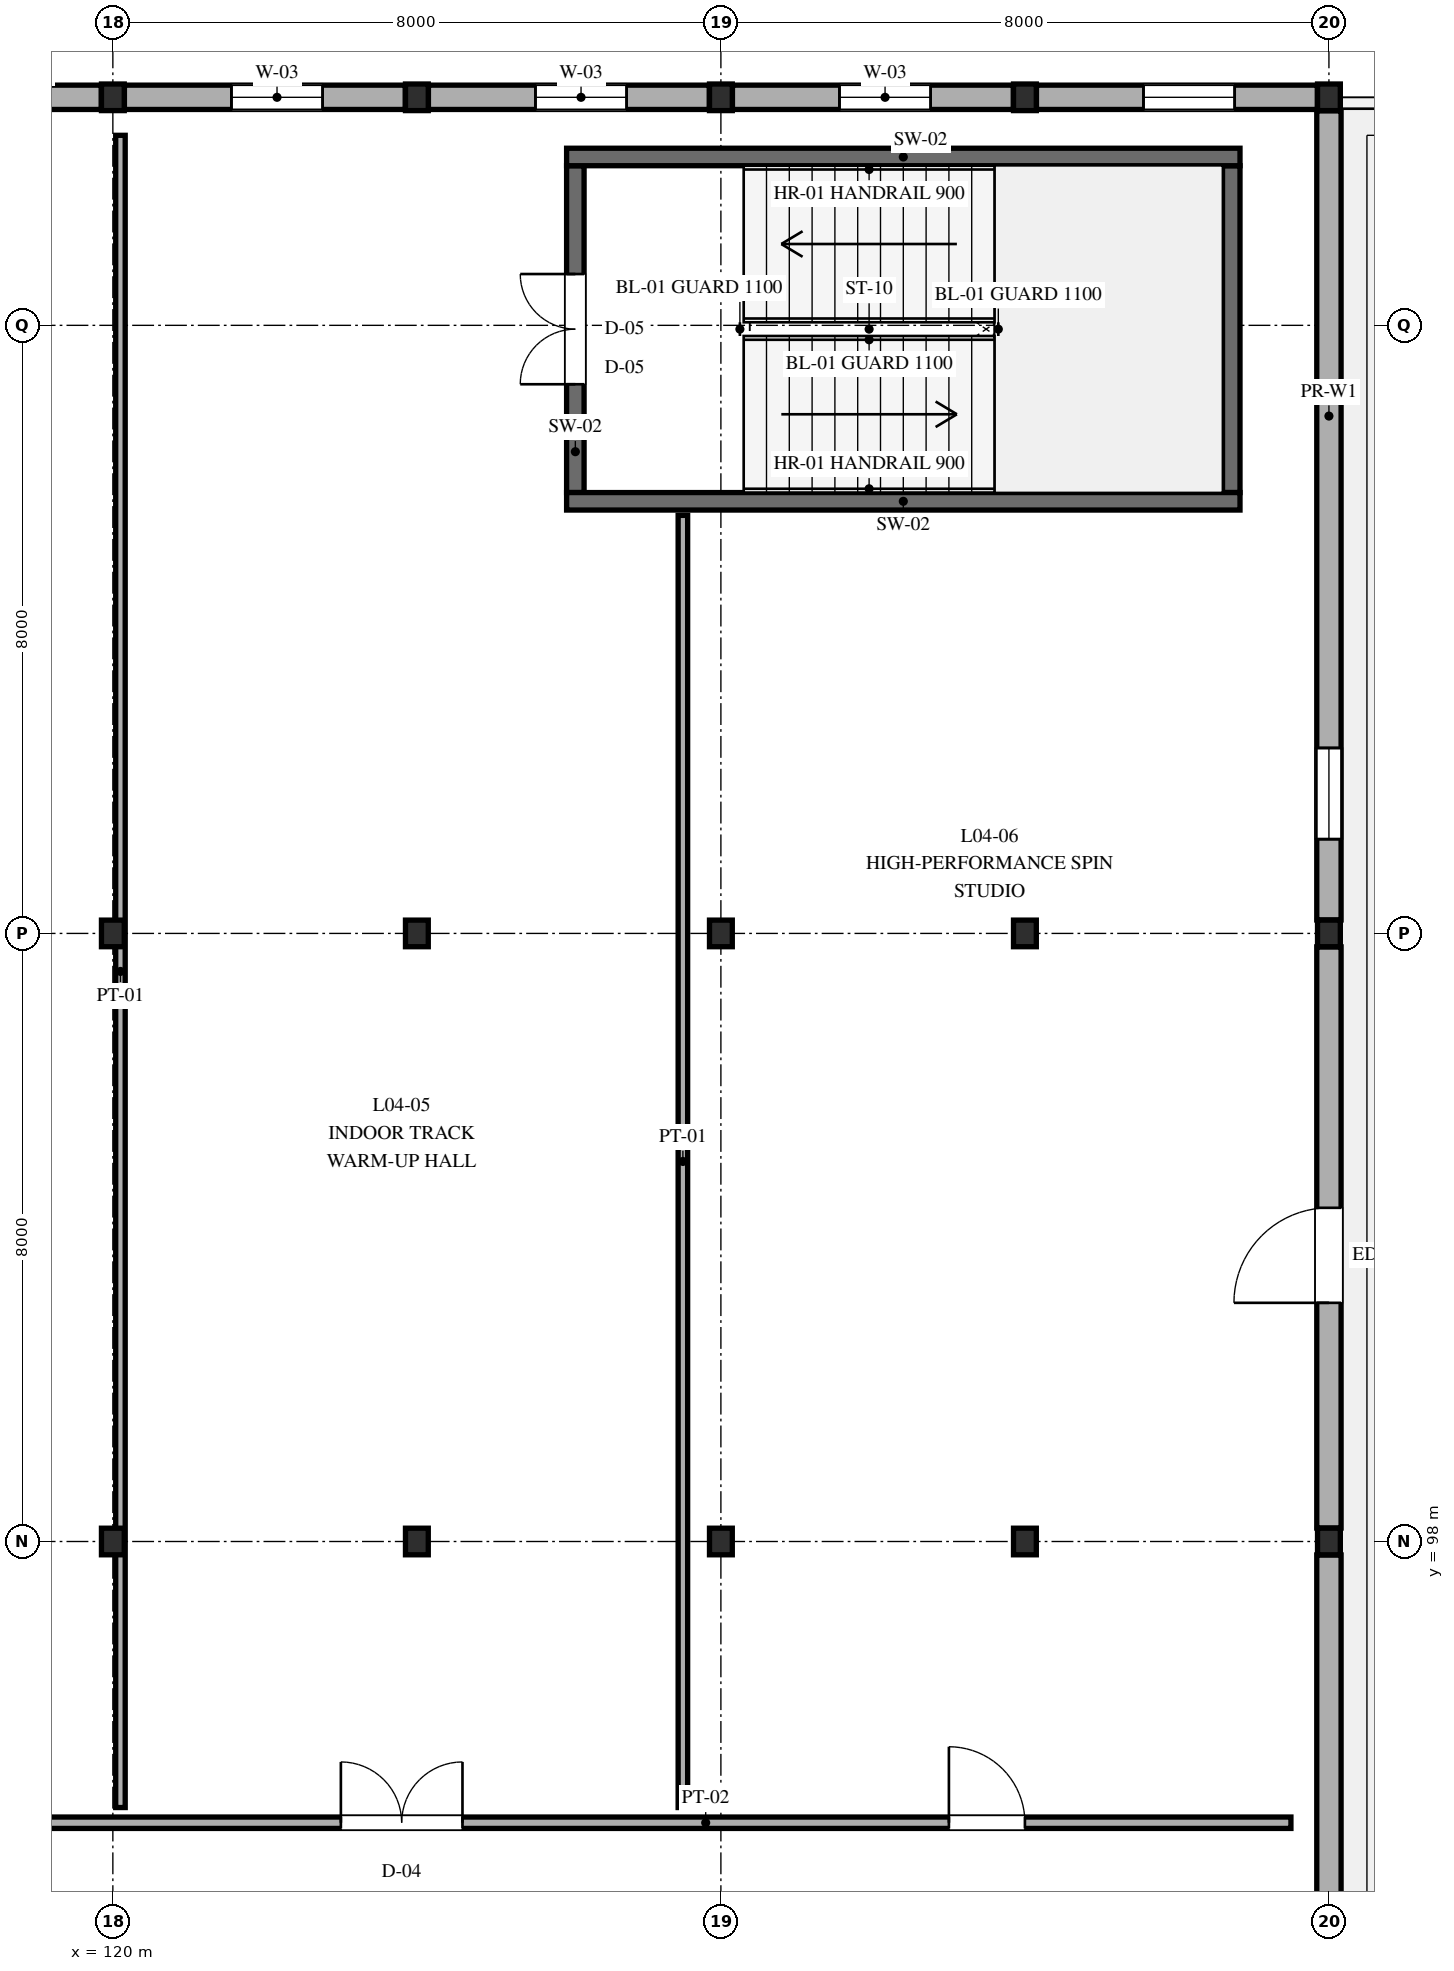
"""IFC4 building model, lengths in metres.
Left out: names, types, materials, properties, quantities, classifications, styles, units other than length and angle.
Written with IfcOpenShell. Run it as: python <this file> out.ifc"""

import sys

from ifc_helpers import new_model, si_unit, direction, frame, frame_2d, origin, origin_2d, place, context, subcontext, project, spatial, rectangle, i_section, extrude, element, fill, save


model = new_model("IFC4")
c1 = context("Model", 3, precision=1e-05, world=origin(), true_north=direction((0.0, 1.0)))
c2 = subcontext(c1, "Body", "Model", "MODEL_VIEW")
j1 = project(units=[si_unit("LENGTHUNIT", "METRE"), si_unit("PLANEANGLEUNIT", "RADIAN")], contexts=[c1])
p1 = place(None, origin())
s1 = spatial("IfcSite", under=j1, at=p1, CompositionType="ELEMENT")
p2 = place(p1, origin())
s2 = spatial("IfcBuilding", under=s1, at=p2, CompositionType="ELEMENT")
p3 = place(p2, frame((0.0, 0.0, 18.6)))
s3 = spatial("IfcBuildingStorey", under=s2, at=p3, CompositionType="ELEMENT", Elevation=18.6)
for number, where, z_axis, x_axis in (
    (1, (120.0, 98.0, 0.0), (0.0, 0.0, 1.0), (1.0, 0.0, 0.0)),
    (2, (120.0, 106.0, 0.0), (0.0, 0.0, 1.0), (1.0, 0.0, 0.0)),
    (3, (120.0, 117.0, 0.0), (0.0, 0.0, 1.0), (1.0, 0.0, 0.0)),
    (4, (124.0, 98.0, 0.0), (0.0, 0.0, 1.0), (1.0, 0.0, 0.0)),
    (5, (124.0, 106.0, 0.0), (0.0, 0.0, 1.0), (1.0, 0.0, 0.0)),
    (6, (124.0, 117.0, 0.0), (0.0, 0.0, 1.0), (1.0, 0.0, 0.0)),
    (7, (128.0, 98.0, 0.0), (0.0, 0.0, 1.0), (1.0, 0.0, 0.0)),
    (8, (128.0, 106.0, 0.0), (0.0, 0.0, 1.0), (1.0, 0.0, 0.0)),
    (9, (128.0, 117.0, 0.0), (0.0, 0.0, 1.0), (1.0, 0.0, 0.0)),
    (10, (132.0, 98.0, 0.0), (0.0, 0.0, 1.0), (1.0, 0.0, 0.0)),
    (11, (132.0, 106.0, 0.0), (0.0, 0.0, 1.0), (1.0, 0.0, 0.0)),
    (12, (132.0, 117.0, 0.0), (0.0, 0.0, 1.0), (1.0, 0.0, 0.0)),
    (13, (136.0, 98.0, 0.0), (0.0, 0.0, 1.0), (1.0, 0.0, 0.0)),
    (14, (136.0, 106.0, 0.0), (0.0, 0.0, 1.0), (1.0, 0.0, 0.0)),
    (15, (136.0, 117.0, 0.0), (0.0, 0.0, 1.0), (1.0, 0.0, 0.0)),
):
    element("IfcColumn", number, at=place(p3, frame(where, z_axis=z_axis, x_axis=x_axis)), inside=s3, PredefinedType="COLUMN", context=c2, shape_type="SweptSolid", body=[
        extrude(i_section(OverallWidth=0.3, OverallDepth=0.35, WebThickness=0.01, FlangeThickness=0.018, FilletRadius=0.027, at=origin_2d()), origin(), (0.0, 0.0, 1.0), 3.6),
    ])
p4 = place(p3, frame((119.848, 117.0, 0.0), z_axis=(0.0, 0.0, 1.0), x_axis=(-1.0, 0.0, 0.0)))
e16 = element("IfcWall", 16, at=p4, inside=s3, PredefinedType="STANDARD", context=c2, shape_type="SweptSolid", body=[
    extrude(rectangle(XDim=7.696, YDim=0.32, at=frame_2d((3.848, 0.0))), origin(), (0.0, 0.0, 1.0), 3.05),
])
p5 = place(p4, frame((2.388, 0.0, 0.95)))
e17 = element("IfcOpeningElement", 17, at=p5, cuts=e16, PredefinedType="OPENING", context=c2, shape_type="SweptSolid", body=[
    extrude(rectangle(XDim=2.1, YDim=1.5, at=frame_2d((1.05, 0.75))), frame((0.0, 0.17, 0.0), z_axis=(0.0, -1.0, 0.0), x_axis=(1.0, 0.0, 0.0)), (0.0, 0.0, 1.0), 0.34),
])
p6 = place(p3, frame((123.848, 117.0, 0.0), z_axis=(0.0, 0.0, 1.0), x_axis=(-1.0, 0.0, 0.0)))
e18 = element("IfcWall", 18, at=p6, inside=s3, PredefinedType="STANDARD", context=c2, shape_type="SweptSolid", body=[
    extrude(rectangle(XDim=3.696, YDim=0.32, at=frame_2d((1.848, 0.0))), origin(), (0.0, 0.0, 1.0), 3.05),
])
p7 = place(p6, frame((1.088, 0.0, 0.95)))
e19 = element("IfcOpeningElement", 19, at=p7, cuts=e18, PredefinedType="OPENING", context=c2, shape_type="SweptSolid", body=[
    extrude(rectangle(XDim=1.2, YDim=1.5, at=frame_2d((0.6, 0.75))), frame((0.0, 0.17, 0.0), z_axis=(0.0, -1.0, 0.0), x_axis=(1.0, 0.0, 0.0)), (0.0, 0.0, 1.0), 0.34),
])
p8 = place(p3, frame((127.848, 117.0, 0.0), z_axis=(0.0, 0.0, 1.0), x_axis=(-1.0, 0.0, 0.0)))
e20 = element("IfcWall", 20, at=p8, inside=s3, PredefinedType="STANDARD", context=c2, shape_type="SweptSolid", body=[
    extrude(rectangle(XDim=3.696, YDim=0.32, at=frame_2d((1.848, 0.0))), origin(), (0.0, 0.0, 1.0), 3.05),
])
p9 = place(p8, frame((1.088, 0.0, 0.95)))
e21 = element("IfcOpeningElement", 21, at=p9, cuts=e20, PredefinedType="OPENING", context=c2, shape_type="SweptSolid", body=[
    extrude(rectangle(XDim=1.2, YDim=1.5, at=frame_2d((0.6, 0.75))), frame((0.0, 0.17, 0.0), z_axis=(0.0, -1.0, 0.0), x_axis=(1.0, 0.0, 0.0)), (0.0, 0.0, 1.0), 0.34),
])
p10 = place(p3, frame((131.848, 117.0, 0.0), z_axis=(0.0, 0.0, 1.0), x_axis=(-1.0, 0.0, 0.0)))
e22 = element("IfcWall", 22, at=p10, inside=s3, PredefinedType="STANDARD", context=c2, shape_type="SweptSolid", body=[
    extrude(rectangle(XDim=3.696, YDim=0.32, at=frame_2d((1.848, 0.0))), origin(), (0.0, 0.0, 1.0), 3.05),
])
p11 = place(p10, frame((1.088, 0.0, 0.95)))
e23 = element("IfcOpeningElement", 23, at=p11, cuts=e22, PredefinedType="OPENING", context=c2, shape_type="SweptSolid", body=[
    extrude(rectangle(XDim=1.2, YDim=1.5, at=frame_2d((0.6, 0.75))), frame((0.0, 0.17, 0.0), z_axis=(0.0, -1.0, 0.0), x_axis=(1.0, 0.0, 0.0)), (0.0, 0.0, 1.0), 0.34),
])
p12 = place(p3, frame((135.848, 117.0, 0.0), z_axis=(0.0, 0.0, 1.0), x_axis=(-1.0, 0.0, 0.0)))
e24 = element("IfcWall", 24, at=p12, inside=s3, PredefinedType="STANDARD", context=c2, shape_type="SweptSolid", body=[
    extrude(rectangle(XDim=3.696, YDim=0.32, at=frame_2d((1.848, 0.0))), origin(), (0.0, 0.0, 1.0), 3.05),
])
p13 = place(p12, frame((1.088, 0.0, 0.95)))
e25 = element("IfcOpeningElement", 25, at=p13, cuts=e24, PredefinedType="OPENING", context=c2, shape_type="SweptSolid", body=[
    extrude(rectangle(XDim=1.2, YDim=1.5, at=frame_2d((0.6, 0.75))), frame((0.0, 0.17, 0.0), z_axis=(0.0, -1.0, 0.0), x_axis=(1.0, 0.0, 0.0)), (0.0, 0.0, 1.0), 0.34),
])
p14 = place(p3, frame((136.0, 90.177, 0.0), z_axis=(0.0, 0.0, 1.0), x_axis=(0.0, 1.0, 0.0)))
e26 = element("IfcWall", 26, at=p14, inside=s3, PredefinedType="STANDARD", context=c2, shape_type="SweptSolid", body=[
    extrude(rectangle(XDim=7.646, YDim=0.32, at=frame_2d((3.823, 0.0))), origin(), (0.0, 0.0, 1.0), 3.05),
])
p15 = place(p14, frame((1.063, 0.0, 0.95)))
e27 = element("IfcOpeningElement", 27, at=p15, cuts=e26, PredefinedType="OPENING", context=c2, shape_type="SweptSolid", body=[
    extrude(rectangle(XDim=1.2, YDim=1.5, at=frame_2d((0.6, 0.75))), frame((0.0, 0.17, 0.0), z_axis=(0.0, -1.0, 0.0), x_axis=(1.0, 0.0, 0.0)), (0.0, 0.0, 1.0), 0.34),
])
p16 = place(p3, frame((136.0, 98.177, 0.0), z_axis=(0.0, 0.0, 1.0), x_axis=(0.0, 1.0, 0.0)))
e28 = element("IfcWall", 28, at=p16, inside=s3, PredefinedType="STANDARD", context=c2, shape_type="SweptSolid", body=[
    extrude(rectangle(XDim=7.646, YDim=0.32, at=frame_2d((3.823, 0.0))), origin(), (0.0, 0.0, 1.0), 3.05),
])
p17 = place(p16, frame((2.963, 0.0, 0.0)))
e29 = element("IfcOpeningElement", 29, at=p17, cuts=e28, PredefinedType="OPENING", context=c2, shape_type="SweptSolid", body=[
    extrude(rectangle(XDim=1.25, YDim=2.2, at=frame_2d((0.625, 1.1))), frame((0.0, 0.17, 0.0), z_axis=(0.0, -1.0, 0.0), x_axis=(1.0, 0.0, 0.0)), (0.0, 0.0, 1.0), 0.34),
])
p18 = place(p3, frame((136.0, 106.177, 0.0), z_axis=(0.0, 0.0, 1.0), x_axis=(0.0, 1.0, 0.0)))
e30 = element("IfcWall", 30, at=p18, inside=s3, PredefinedType="STANDARD", context=c2, shape_type="SweptSolid", body=[
    extrude(rectangle(XDim=10.646, YDim=0.32, at=frame_2d((5.323, 0.0))), origin(), (0.0, 0.0, 1.0), 3.05),
])
p19 = place(p18, frame((1.063, 0.0, 0.95)))
e31 = element("IfcOpeningElement", 31, at=p19, cuts=e30, PredefinedType="OPENING", context=c2, shape_type="SweptSolid", body=[
    extrude(rectangle(XDim=1.2, YDim=1.5, at=frame_2d((0.6, 0.75))), frame((0.0, 0.17, 0.0), z_axis=(0.0, -1.0, 0.0), x_axis=(1.0, 0.0, 0.0)), (0.0, 0.0, 1.0), 0.34),
])
p20 = place(p3, frame((126.085, 111.8, 0.0), z_axis=(0.0, 0.0, 1.0), x_axis=(0.0, 1.0, 0.0)))
e32 = element("IfcWall", 32, at=p20, inside=s3, PredefinedType="SHEAR", context=c2, shape_type="SweptSolid", body=[
    extrude(rectangle(XDim=4.3, YDim=0.23, at=frame_2d((2.15, 0.0))), origin(), (0.0, 0.0, 1.0), 3.6),
])
p21 = place(p20, frame((1.425, 0.0, 0.0)))
e33 = element("IfcOpeningElement", 33, at=p21, cuts=e32, PredefinedType="OPENING", context=c2, shape_type="SweptSolid", body=[
    extrude(rectangle(XDim=1.45, YDim=2.2, at=frame_2d((0.725, 1.1))), frame((0.0, 0.125, 0.0), z_axis=(0.0, -1.0, 0.0), x_axis=(1.0, 0.0, 0.0)), (0.0, 0.0, 1.0), 0.25),
])
p22 = place(p3, frame((134.715, 116.1, 0.0), z_axis=(0.0, 0.0, 1.0), x_axis=(0.0, -1.0, 0.0)))
e34 = element("IfcWall", 34, at=p22, inside=s3, PredefinedType="SHEAR", context=c2, shape_type="SweptSolid", body=[
    extrude(rectangle(XDim=4.3, YDim=0.23, at=frame_2d((2.15, 0.0))), origin(), (0.0, 0.0, 1.0), 3.6),
])
for number, where, z_axis, x_axis in (
    (35, (125.97, 111.685, 0.0), (0.0, 0.0, 1.0), (1.0, 0.0, 0.0)),
    (36, (134.83, 116.215, 0.0), (0.0, 0.0, 1.0), (-1.0, 0.0, 0.0)),
):
    element("IfcWall", number, at=place(p3, frame(where, z_axis=z_axis, x_axis=x_axis)), inside=s3, PredefinedType="SHEAR", context=c2, shape_type="SweptSolid", body=[
        extrude(rectangle(XDim=8.86, YDim=0.23, at=frame_2d((4.43, 0.0))), origin(), (0.0, 0.0, 1.0), 3.6),
    ])
p23 = place(p3, frame((104.5, 94.3, 0.0), z_axis=(0.0, 0.0, 1.0), x_axis=(1.0, 0.0, 0.0)))
e37 = element("IfcWall", 37, at=p23, inside=s3, PredefinedType="PARTITIONING", context=c2, shape_type="SweptSolid", body=[
    extrude(rectangle(XDim=31.0, YDim=0.15, at=frame_2d((15.5, 0.0))), origin(), (0.0, 0.0, 1.0), 3.05),
])
p24 = place(p23, frame((3.2, 0.0, 0.0)))
e38 = element("IfcOpeningElement", 38, at=p24, cuts=e37, PredefinedType="OPENING", context=c2, shape_type="SweptSolid", body=[
    extrude(rectangle(XDim=1.05, YDim=2.15, at=frame_2d((0.525, 1.075))), frame((0.0, 0.085, 0.0), z_axis=(0.0, -1.0, 0.0), x_axis=(1.0, 0.0, 0.0)), (0.0, 0.0, 1.0), 0.17),
])
p25 = place(p23, frame((11.5, 0.0, 0.0)))
e39 = element("IfcOpeningElement", 39, at=p25, cuts=e37, PredefinedType="OPENING", context=c2, shape_type="SweptSolid", body=[
    extrude(rectangle(XDim=1.6, YDim=2.2, at=frame_2d((0.8, 1.1))), frame((0.0, 0.085, 0.0), z_axis=(0.0, -1.0, 0.0), x_axis=(1.0, 0.0, 0.0)), (0.0, 0.0, 1.0), 0.17),
])
p26 = place(p23, frame((18.5, 0.0, 0.0)))
e40 = element("IfcOpeningElement", 40, at=p26, cuts=e37, PredefinedType="OPENING", context=c2, shape_type="SweptSolid", body=[
    extrude(rectangle(XDim=1.6, YDim=2.2, at=frame_2d((0.8, 1.1))), frame((0.0, 0.085, 0.0), z_axis=(0.0, -1.0, 0.0), x_axis=(1.0, 0.0, 0.0)), (0.0, 0.0, 1.0), 0.17),
])
p27 = place(p23, frame((26.5, 0.0, 0.0)))
e41 = element("IfcOpeningElement", 41, at=p27, cuts=e37, PredefinedType="OPENING", context=c2, shape_type="SweptSolid", body=[
    extrude(rectangle(XDim=1.0, YDim=2.15, at=frame_2d((0.5, 1.075))), frame((0.0, 0.085, 0.0), z_axis=(0.0, -1.0, 0.0), x_axis=(1.0, 0.0, 0.0)), (0.0, 0.0, 1.0), 0.17),
])
p28 = place(p3, frame((120.1, 94.5, 0.0), z_axis=(0.0, 0.0, 1.0), x_axis=(0.0, 1.0, 0.0)))
e42 = element("IfcWall", 42, at=p28, inside=s3, PredefinedType="PARTITIONING", context=c2, shape_type="SweptSolid", body=[
    extrude(rectangle(XDim=22.0, YDim=0.125, at=frame_2d((11.0, 0.0))), origin(), (0.0, 0.0, 1.0), 2.985),
])
p29 = place(p3, frame((127.5, 94.5, 0.0), z_axis=(0.0, 0.0, 1.0), x_axis=(0.0, 1.0, 0.0)))
e43 = element("IfcWall", 43, at=p29, inside=s3, PredefinedType="PARTITIONING", context=c2, shape_type="SweptSolid", body=[
    extrude(rectangle(XDim=17.0, YDim=0.125, at=frame_2d((8.5, 0.0))), origin(), (0.0, 0.0, 1.0), 3.05),
])
p30 = place(p7, origin())
e44 = element("IfcWindow", 44, at=p30, inside=s3, PartitioningType="SINGLE_PANEL", PredefinedType="WINDOW", context=c2, shape_type="SweptSolid", body=[
    extrude(rectangle(XDim=1.2, YDim=1.5, at=frame_2d((0.6, 0.75))), frame((0.0, 0.03, 0.0), z_axis=(0.0, -1.0, 0.0), x_axis=(1.0, 0.0, 0.0)), (0.0, 0.0, 1.0), 0.06),
])
fill(e19, e44)
p31 = place(p9, origin())
e45 = element("IfcWindow", 45, at=p31, inside=s3, PartitioningType="SINGLE_PANEL", PredefinedType="WINDOW", context=c2, shape_type="SweptSolid", body=[
    extrude(rectangle(XDim=1.2, YDim=1.5, at=frame_2d((0.6, 0.75))), frame((0.0, 0.03, 0.0), z_axis=(0.0, -1.0, 0.0), x_axis=(1.0, 0.0, 0.0)), (0.0, 0.0, 1.0), 0.06),
])
fill(e21, e45)
p32 = place(p11, origin())
e46 = element("IfcWindow", 46, at=p32, inside=s3, PartitioningType="SINGLE_PANEL", PredefinedType="WINDOW", context=c2, shape_type="SweptSolid", body=[
    extrude(rectangle(XDim=1.2, YDim=1.5, at=frame_2d((0.6, 0.75))), frame((0.0, 0.03, 0.0), z_axis=(0.0, -1.0, 0.0), x_axis=(1.0, 0.0, 0.0)), (0.0, 0.0, 1.0), 0.06),
])
fill(e23, e46)
p33 = place(p13, origin())
e47 = element("IfcWindow", 47, at=p33, inside=s3, PartitioningType="SINGLE_PANEL", PredefinedType="WINDOW", context=c2, shape_type="SweptSolid", body=[
    extrude(rectangle(XDim=1.2, YDim=1.5, at=frame_2d((0.6, 0.75))), frame((0.0, 0.03, 0.0), z_axis=(0.0, -1.0, 0.0), x_axis=(1.0, 0.0, 0.0)), (0.0, 0.0, 1.0), 0.06),
])
fill(e25, e47)
p34 = place(p17, origin())
e48 = element("IfcDoor", 48, at=p34, inside=s3, OperationType="SINGLE_SWING_LEFT", PredefinedType="DOOR", context=c2, shape_type="SweptSolid", body=[
    extrude(rectangle(XDim=1.25, YDim=2.2, at=frame_2d((0.625, 1.1))), frame((0.0, 0.025, 0.0), z_axis=(0.0, -1.0, 0.0), x_axis=(1.0, 0.0, 0.0)), (0.0, 0.0, 1.0), 0.05),
])
fill(e29, e48)
p35 = place(p19, origin())
e49 = element("IfcWindow", 49, at=p35, inside=s3, PartitioningType="SINGLE_PANEL", PredefinedType="WINDOW", context=c2, shape_type="SweptSolid", body=[
    extrude(rectangle(XDim=1.2, YDim=1.5, at=frame_2d((0.6, 0.75))), frame((0.0, 0.03, 0.0), z_axis=(0.0, -1.0, 0.0), x_axis=(1.0, 0.0, 0.0)), (0.0, 0.0, 1.0), 0.06),
])
fill(e31, e49)
p36 = place(p21, origin())
e50 = element("IfcDoor", 50, at=p36, inside=s3, OperationType="DOUBLE_DOOR_SINGLE_SWING", PredefinedType="DOOR", context=c2, shape_type="SweptSolid", body=[
    extrude(rectangle(XDim=1.45, YDim=2.2, at=frame_2d((0.725, 1.1))), frame((0.0, 0.025, 0.0), z_axis=(0.0, -1.0, 0.0), x_axis=(1.0, 0.0, 0.0)), (0.0, 0.0, 1.0), 0.05),
])
fill(e33, e50)
p37 = place(p26, origin())
e51 = element("IfcDoor", 51, at=p37, inside=s3, OperationType="DOUBLE_DOOR_SINGLE_SWING", PredefinedType="DOOR", context=c2, shape_type="SweptSolid", body=[
    extrude(rectangle(XDim=1.6, YDim=2.2, at=frame_2d((0.8, 1.1))), frame((0.0, 0.025, 0.0), z_axis=(0.0, -1.0, 0.0), x_axis=(1.0, 0.0, 0.0)), (0.0, 0.0, 1.0), 0.05),
])
fill(e40, e51)
p38 = place(p27, origin())
e52 = element("IfcDoor", 52, at=p38, inside=s3, OperationType="SINGLE_SWING_LEFT", PredefinedType="DOOR", context=c2, shape_type="SweptSolid", body=[
    extrude(rectangle(XDim=1.0, YDim=2.15, at=frame_2d((0.5, 1.075))), frame((0.0, 0.025, 0.0), z_axis=(0.0, -1.0, 0.0), x_axis=(1.0, 0.0, 0.0)), (0.0, 0.0, 1.0), 0.05),
])
fill(e41, e52)
save(model, sys.argv[1])
